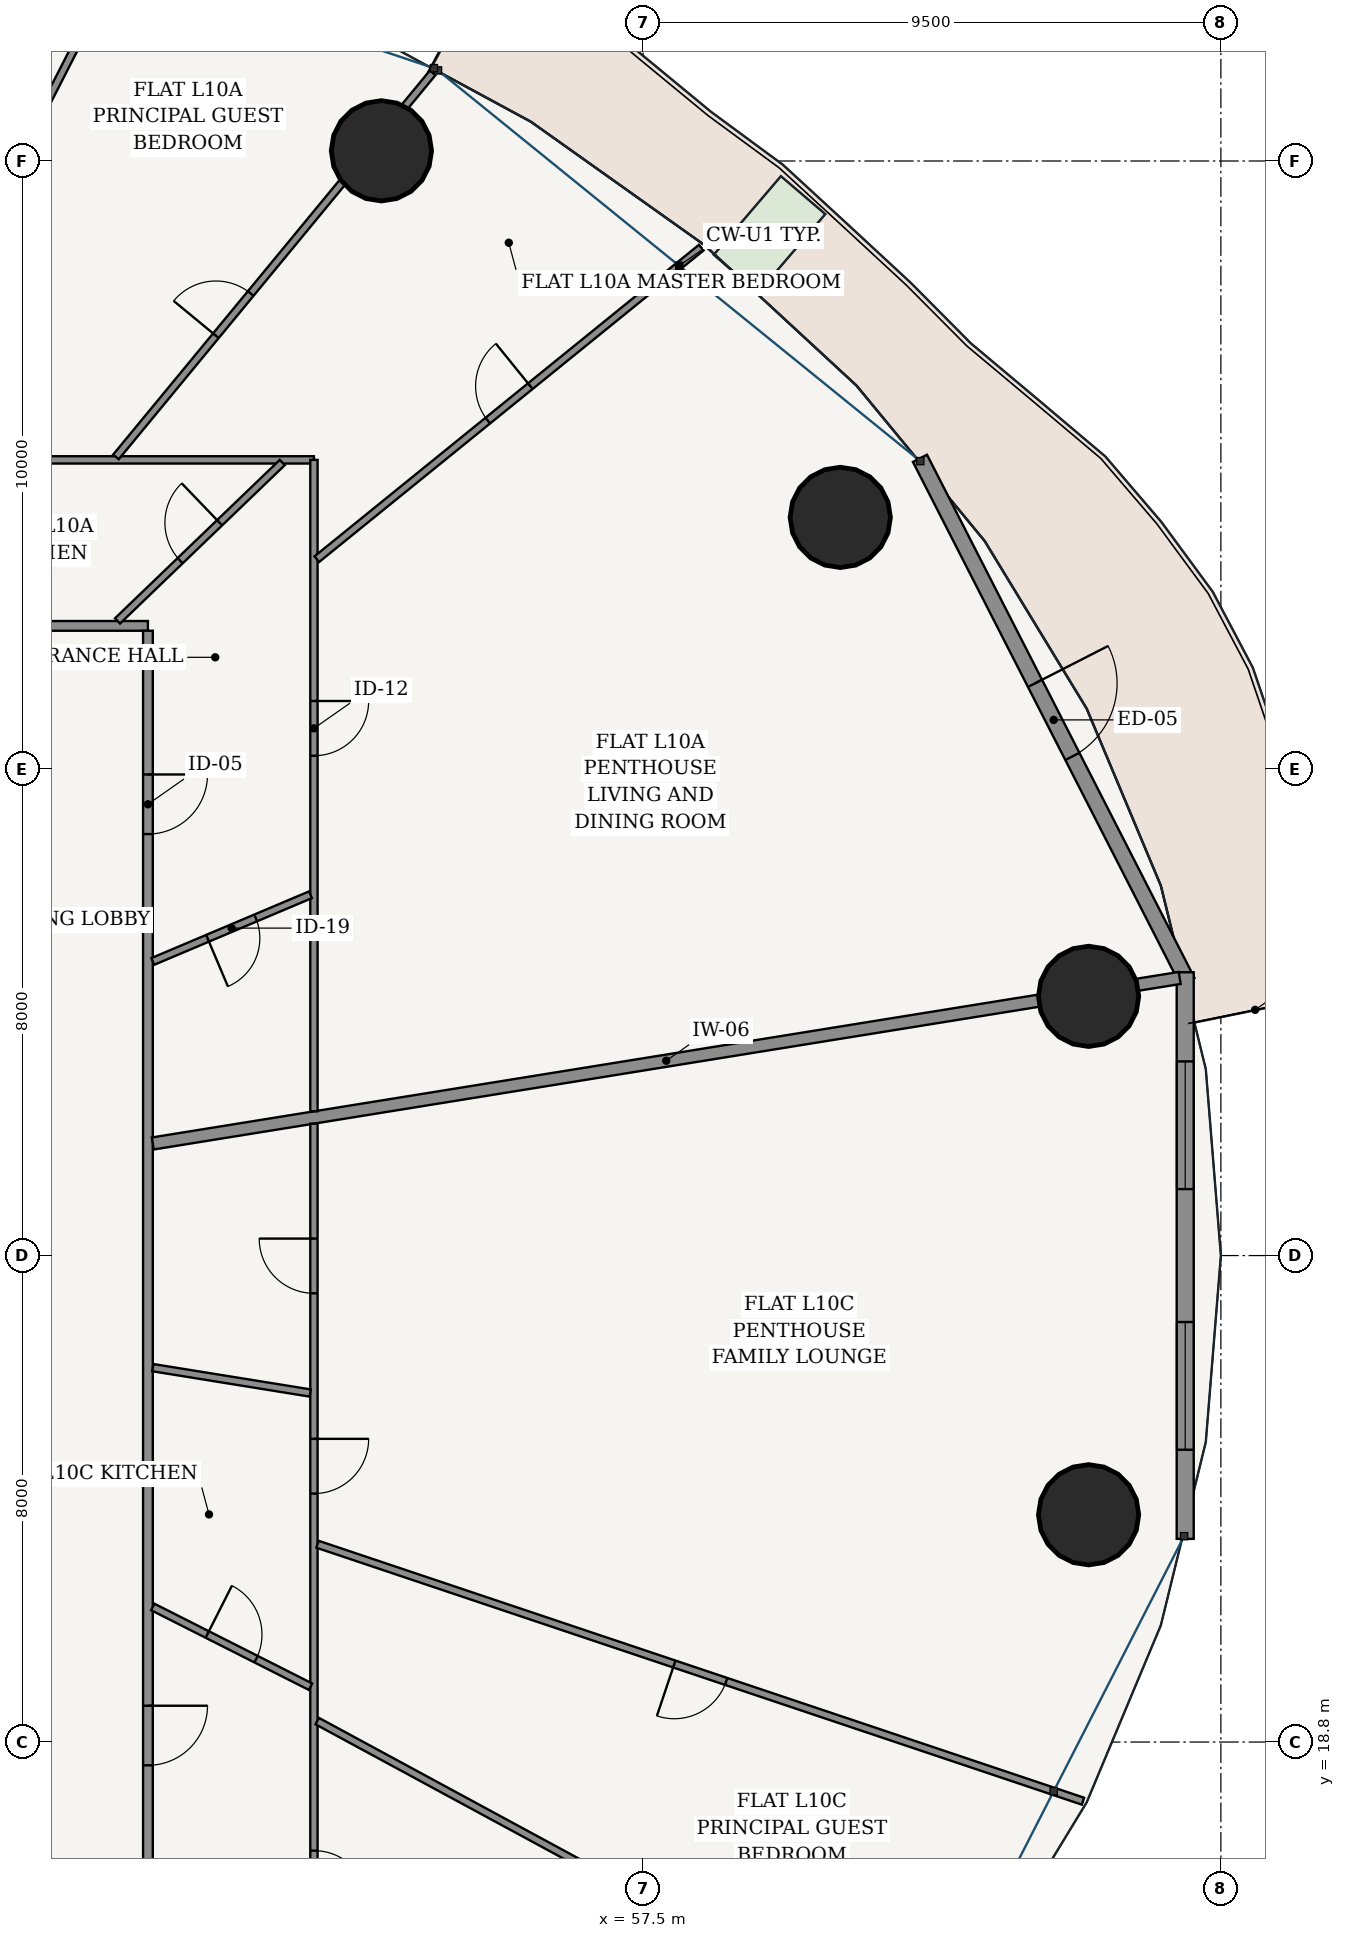
"""IFC4 building model, lengths in metres.
Left out: names, types, materials, properties, quantities, classifications, styles, units other than length and angle.
Written with IfcOpenShell. Run it as: python <this file> out.ifc"""

import sys

from ifc_helpers import new_model, si_unit, direction, frame, frame_2d, origin, origin_2d, place, context, subcontext, project, spatial, rectangle, hollow_circle, extrude, source, transform, mapped, element, fill, save


model = new_model("IFC4")
c1 = context("Model", 3, precision=1e-05, world=origin(), true_north=direction((-0.2419218956, 0.970295726276)))
c2 = subcontext(c1, "Body", "Model", "MODEL_VIEW")
j1 = project(units=[si_unit("LENGTHUNIT", "METRE"), si_unit("PLANEANGLEUNIT", "RADIAN")], contexts=[c1])
p1 = place(None, origin())
s1 = spatial("IfcSite", under=j1, at=p1, CompositionType="ELEMENT")
p2 = place(p1, origin())
s2 = spatial("IfcBuilding", under=s1, at=p2, CompositionType="ELEMENT")
p3 = place(p2, frame((0.0, 0.0, 42.0)))
s3 = spatial("IfcBuildingStorey", under=s2, at=p3, CompositionType="ELEMENT", Elevation=42.0)
for number, where, z_axis, x_axis in (
    (1, (64.824, 31.063, 0.0), (0.0, 0.0, 1.0), (1.0, 0.0, 0.0)),
    (2, (60.741, 38.939, 0.0), (0.0, 0.0, 1.0), (1.0, 0.0, 0.0)),
    (3, (53.195, 44.968, 0.0), (0.0, 0.0, 1.0), (1.0, 0.0, 0.0)),
    (4, (64.824, 22.537, 0.0), (0.0, 0.0, 1.0), (1.0, 0.0, 0.0)),
):
    element("IfcColumn", number, at=place(p3, frame(where, z_axis=z_axis, x_axis=x_axis)), inside=s3, PredefinedType="COLUMN", context=c2, shape_type="SweptSolid", body=[
        extrude(hollow_circle(Radius=0.825, WallThickness=0.05, at=origin_2d()), origin(), (0.0, 0.0, 1.0), 3.6),
    ])
p4 = place(p3, frame((66.45, 31.308, 0.0), z_axis=(0.0, 0.0, 1.0), x_axis=(-0.45523081716, 0.890373462715, 0.0)))
e5 = element("IfcWall", 5, at=p4, inside=s3, PredefinedType="SOLIDWALL", context=c2, shape_type="SweptSolid", body=[
    extrude(rectangle(XDim=9.662, YDim=0.26, at=frame_2d((4.831, 0.0))), origin(), (0.0, 0.0, 1.0), 3.32),
])
p5 = place(p4, frame((4.156, 0.0, 0.0)))
e6 = element("IfcOpeningElement", 6, at=p5, cuts=e5, PredefinedType="OPENING", context=c2, shape_type="SweptSolid", body=[
    extrude(rectangle(XDim=1.35, YDim=2.2, at=frame_2d((0.675, 1.1))), frame((0.0, 0.14, 0.0), z_axis=(0.0, -1.0, 0.0), x_axis=(1.0, 0.0, 0.0)), (0.0, 0.0, 1.0), 0.28),
])
p6 = place(p3, frame((66.413, 22.141, 0.0), z_axis=(0.0, 0.0, 1.0), x_axis=(0.0, 1.0, 0.0)))
e7 = element("IfcWall", 7, at=p6, inside=s3, PredefinedType="SOLIDWALL", context=c2, shape_type="SweptSolid", body=[
    extrude(rectangle(XDim=9.318, YDim=0.28, at=frame_2d((4.659, 0.0))), origin(), (0.0, 0.0, 1.0), 3.32),
])
p7 = place(p6, frame((1.466, 0.0, 0.85)))
e8 = element("IfcOpeningElement", 8, at=p7, cuts=e7, PredefinedType="OPENING", context=c2, shape_type="SweptSolid", body=[
    extrude(rectangle(XDim=2.1, YDim=1.95, at=frame_2d((1.05, 0.975))), frame((0.0, 0.15, 0.0), z_axis=(0.0, -1.0, 0.0), x_axis=(1.0, 0.0, 0.0)), (0.0, 0.0, 1.0), 0.3),
])
p8 = place(p6, frame((5.752, 0.0, 0.85)))
e9 = element("IfcOpeningElement", 9, at=p8, cuts=e7, PredefinedType="OPENING", context=c2, shape_type="SweptSolid", body=[
    extrude(rectangle(XDim=2.1, YDim=1.95, at=frame_2d((1.05, 0.975))), frame((0.0, 0.15, 0.0), z_axis=(0.0, -1.0, 0.0), x_axis=(1.0, 0.0, 0.0)), (0.0, 0.0, 1.0), 0.3),
])
p9 = place(p3, frame((26.645, 37.155, 0.0), z_axis=(0.0, 0.0, 1.0), x_axis=(1.0, 0.0, 0.0)))
e10 = element("IfcWall", 10, at=p9, inside=s3, PredefinedType="PARTITIONING", context=c2, shape_type="SweptSolid", body=[
    extrude(rectangle(XDim=22.71, YDim=0.16, at=frame_2d((11.355, 0.0))), origin(), (0.0, 0.0, 1.0), 2.688),
])
p10 = place(p3, frame((49.355, 16.525, 0.0), z_axis=(0.0, 0.0, 1.0), x_axis=(0.0, 1.0, 0.0)))
e11 = element("IfcWall", 11, at=p10, inside=s3, PredefinedType="PARTITIONING", context=c2, shape_type="SweptSolid", body=[
    extrude(rectangle(XDim=20.55, YDim=0.16, at=frame_2d((10.275, 0.0))), origin(), (0.0, 0.0, 1.0), 2.688),
])
p11 = place(p10, frame((17.207, 0.0, 0.0)))
e12 = element("IfcOpeningElement", 12, at=p11, cuts=e11, PredefinedType="OPENING", context=c2, shape_type="SweptSolid", body=[
    extrude(rectangle(XDim=0.98, YDim=2.2, at=frame_2d((0.49, 1.1))), frame((0.0, 0.09, 0.0), z_axis=(0.0, -1.0, 0.0), x_axis=(1.0, 0.0, 0.0)), (0.0, 0.0, 1.0), 0.18),
])
p12 = place(p10, frame((1.892, 0.0, 0.0)))
e13 = element("IfcOpeningElement", 13, at=p12, cuts=e11, PredefinedType="OPENING", context=c2, shape_type="SweptSolid", body=[
    extrude(rectangle(XDim=0.98, YDim=2.2, at=frame_2d((0.49, 1.1))), frame((0.0, 0.09, 0.0), z_axis=(0.0, -1.0, 0.0), x_axis=(1.0, 0.0, 0.0)), (0.0, 0.0, 1.0), 0.18),
])
p13 = place(p3, frame((49.435, 28.643, 0.0), z_axis=(0.0, 0.0, 1.0), x_axis=(0.987255953651, 0.159140447344, 0.0)))
e14 = element("IfcWall", 14, at=p13, inside=s3, PredefinedType="PARTITIONING", context=c2, shape_type="SweptSolid", body=[
    extrude(rectangle(XDim=17.105, YDim=0.2, at=frame_2d((8.553, 0.0))), origin(), (0.0, 0.0, 1.0), 2.688),
])
p14 = place(p3, frame((27.312, 39.885, 0.0), z_axis=(0.0, 0.0, 1.0), x_axis=(1.0, 0.0, 0.0)))
e15 = element("IfcWall", 15, at=p14, inside=s3, PredefinedType="PARTITIONING", context=c2, shape_type="SweptSolid", body=[
    extrude(rectangle(XDim=24.772, YDim=0.12, at=frame_2d((12.386, 0.0))), origin(), (0.0, 0.0, 1.0), 2.688),
])
p15 = place(p3, frame((52.085, 39.885, 0.0), z_axis=(0.0, 0.0, 1.0), x_axis=(0.0, -1.0, 0.0)))
e16 = element("IfcWall", 16, at=p15, inside=s3, PredefinedType="PARTITIONING", context=c2, shape_type="SweptSolid", body=[
    extrude(rectangle(XDim=10.713, YDim=0.12, at=frame_2d((5.356, 0.0))), origin(), (0.0, 0.0, 1.0), 2.688),
])
p16 = place(p15, frame((3.965, 0.0, 0.0)))
e17 = element("IfcOpeningElement", 17, at=p16, cuts=e16, PredefinedType="OPENING", context=c2, shape_type="SweptSolid", body=[
    extrude(rectangle(XDim=0.9, YDim=2.15, at=frame_2d((0.45, 1.075))), frame((0.0, 0.07, 0.0), z_axis=(0.0, -1.0, 0.0), x_axis=(1.0, 0.0, 0.0)), (0.0, 0.0, 1.0), 0.14),
])
p17 = place(p3, frame((52.133, 38.253, 0.0), z_axis=(0.0, 0.0, 1.0), x_axis=(0.776936623447, 0.629578814087, 0.0)))
e18 = element("IfcWall", 18, at=p17, inside=s3, PredefinedType="PARTITIONING", context=c2, shape_type="SweptSolid", body=[
    extrude(rectangle(XDim=8.136, YDim=0.12, at=frame_2d((4.068, 0.0))), origin(), (0.0, 0.0, 1.0), 2.762),
])
p18 = place(p17, frame((3.618, 0.0, 0.0)))
e19 = element("IfcOpeningElement", 19, at=p18, cuts=e18, PredefinedType="OPENING", context=c2, shape_type="SweptSolid", body=[
    extrude(rectangle(XDim=0.9, YDim=2.15, at=frame_2d((0.45, 1.075))), frame((0.0, 0.07, 0.0), z_axis=(0.0, -1.0, 0.0), x_axis=(1.0, 0.0, 0.0)), (0.0, 0.0, 1.0), 0.14),
])
p19 = place(p3, frame((48.829, 39.933, 0.0), z_axis=(0.0, 0.0, 1.0), x_axis=(0.636192172227, 0.771530634516, 0.0)))
e20 = element("IfcWall", 20, at=p19, inside=s3, PredefinedType="PARTITIONING", context=c2, shape_type="SweptSolid", body=[
    extrude(rectangle(XDim=8.186, YDim=0.12, at=frame_2d((4.093, 0.0))), origin(), (0.0, 0.0, 1.0), 2.688),
])
p20 = place(p19, frame((2.584, 0.0, 0.0)))
e21 = element("IfcOpeningElement", 21, at=p20, cuts=e20, PredefinedType="OPENING", context=c2, shape_type="SweptSolid", body=[
    extrude(rectangle(XDim=0.9, YDim=2.15, at=frame_2d((0.45, 1.075))), frame((0.0, 0.07, 0.0), z_axis=(0.0, -1.0, 0.0), x_axis=(1.0, 0.0, 0.0)), (0.0, 0.0, 1.0), 0.14),
])
p21 = place(p3, frame((44.717, 39.94, 0.0), z_axis=(0.0, 0.0, 1.0), x_axis=(0.455131303234, 0.890424335256, 0.0)))
e22 = element("IfcWall", 22, at=p21, inside=s3, PredefinedType="PARTITIONING", context=c2, shape_type="SweptSolid", body=[
    extrude(rectangle(XDim=9.562, YDim=0.12, at=frame_2d((4.781, 0.0))), origin(), (0.0, 0.0, 1.0), 2.762),
])
p22 = place(p21, frame((4.331, 0.0, 0.0)))
e23 = element("IfcOpeningElement", 23, at=p22, cuts=e22, PredefinedType="OPENING", context=c2, shape_type="SweptSolid", body=[
    extrude(rectangle(XDim=0.9, YDim=2.15, at=frame_2d((0.45, 1.075))), frame((0.0, 0.07, 0.0), z_axis=(0.0, -1.0, 0.0), x_axis=(1.0, 0.0, 0.0)), (0.0, 0.0, 1.0), 0.14),
])
p23 = place(p3, frame((49.435, 31.636, 0.0), z_axis=(0.0, 0.0, 1.0), x_axis=(0.920969644836, 0.389634332792, 0.0)))
e24 = element("IfcWall", 24, at=p23, inside=s3, PredefinedType="PARTITIONING", context=c2, shape_type="SweptSolid", body=[
    extrude(rectangle(XDim=2.815, YDim=0.12, at=frame_2d((1.408, 0.0))), origin(), (0.0, 0.0, 1.0), 3.32),
])
p24 = place(p23, frame((0.978, 0.0, 0.0)))
e25 = element("IfcOpeningElement", 25, at=p24, cuts=e24, PredefinedType="OPENING", context=c2, shape_type="SweptSolid", body=[
    extrude(rectangle(XDim=0.86, YDim=2.15, at=frame_2d((0.43, 1.075))), frame((0.0, 0.07, 0.0), z_axis=(0.0, -1.0, 0.0), x_axis=(1.0, 0.0, 0.0)), (0.0, 0.0, 1.0), 0.14),
])
p25 = place(p3, frame((48.855, 37.236, 0.0), z_axis=(0.0, 0.0, 1.0), x_axis=(0.720835560675, 0.693106120638, 0.0)))
e26 = element("IfcWall", 26, at=p25, inside=s3, PredefinedType="PARTITIONING", context=c2, shape_type="SweptSolid", body=[
    extrude(rectangle(XDim=3.76, YDim=0.12, at=frame_2d((1.88, 0.0))), origin(), (0.0, 0.0, 1.0), 2.999),
])
p26 = place(p25, frame((1.43, 0.0, 0.0)))
e27 = element("IfcOpeningElement", 27, at=p26, cuts=e26, PredefinedType="OPENING", context=c2, shape_type="SweptSolid", body=[
    extrude(rectangle(XDim=0.9, YDim=2.15, at=frame_2d((0.45, 1.075))), frame((0.0, 0.07, 0.0), z_axis=(0.0, -1.0, 0.0), x_axis=(1.0, 0.0, 0.0)), (0.0, 0.0, 1.0), 0.14),
])
p27 = place(p3, frame((52.085, 28.968, 0.0), z_axis=(0.0, 0.0, 1.0), x_axis=(0.0, -1.0, 0.0)))
e28 = element("IfcWall", 28, at=p27, inside=s3, PredefinedType="PARTITIONING", context=c2, shape_type="SweptSolid", body=[
    extrude(rectangle(XDim=15.253, YDim=0.12, at=frame_2d((7.626, 0.0))), origin(), (0.0, 0.0, 1.0), 2.688),
])
p28 = place(p27, frame((11.954, 0.0, 0.0)))
e29 = element("IfcOpeningElement", 29, at=p28, cuts=e28, PredefinedType="OPENING", context=c2, shape_type="SweptSolid", body=[
    extrude(rectangle(XDim=0.9, YDim=2.15, at=frame_2d((0.45, 1.075))), frame((0.0, 0.07, 0.0), z_axis=(0.0, -1.0, 0.0), x_axis=(1.0, 0.0, 0.0)), (0.0, 0.0, 1.0), 0.14),
])
p29 = place(p27, frame((5.182, 0.0, 0.0)))
e30 = element("IfcOpeningElement", 30, at=p29, cuts=e28, PredefinedType="OPENING", context=c2, shape_type="SweptSolid", body=[
    extrude(rectangle(XDim=0.9, YDim=2.15, at=frame_2d((0.45, 1.075))), frame((0.0, 0.07, 0.0), z_axis=(0.0, -1.0, 0.0), x_axis=(1.0, 0.0, 0.0)), (0.0, 0.0, 1.0), 0.14),
])
p30 = place(p27, frame((1.889, 0.0, 0.0)))
e31 = element("IfcOpeningElement", 31, at=p30, cuts=e28, PredefinedType="OPENING", context=c2, shape_type="SweptSolid", body=[
    extrude(rectangle(XDim=0.9, YDim=2.15, at=frame_2d((0.45, 1.075))), frame((0.0, 0.07, 0.0), z_axis=(0.0, -1.0, 0.0), x_axis=(1.0, 0.0, 0.0)), (0.0, 0.0, 1.0), 0.14),
])
p31 = place(p3, frame((52.139, 19.144, 0.0), z_axis=(0.0, 0.0, 1.0), x_axis=(0.879372452045, -0.476134529922, 0.0)))
e32 = element("IfcWall", 32, at=p31, inside=s3, PredefinedType="PARTITIONING", context=c2, shape_type="SweptSolid", body=[
    extrude(rectangle(XDim=11.219, YDim=0.12, at=frame_2d((5.61, 0.0))), origin(), (0.0, 0.0, 1.0), 2.688),
])
p32 = place(p3, frame((52.144, 22.052, 0.0), z_axis=(0.0, 0.0, 1.0), x_axis=(0.948023034133, -0.318201707653, 0.0)))
e33 = element("IfcWall", 33, at=p32, inside=s3, PredefinedType="PARTITIONING", context=c2, shape_type="SweptSolid", body=[
    extrude(rectangle(XDim=13.279, YDim=0.12, at=frame_2d((6.639, 0.0))), origin(), (0.0, 0.0, 1.0), 2.762),
])
p33 = place(p32, frame((6.189, 0.0, 0.0)))
e34 = element("IfcOpeningElement", 34, at=p33, cuts=e33, PredefinedType="OPENING", context=c2, shape_type="SweptSolid", body=[
    extrude(rectangle(XDim=0.9, YDim=2.15, at=frame_2d((0.45, 1.075))), frame((0.0, 0.07, 0.0), z_axis=(0.0, -1.0, 0.0), x_axis=(1.0, 0.0, 0.0)), (0.0, 0.0, 1.0), 0.14),
])
p34 = place(p3, frame((49.435, 21.021, 0.0), z_axis=(0.0, 0.0, 1.0), x_axis=(0.892504324967, -0.451038834155, 0.0)))
e35 = element("IfcWall", 35, at=p34, inside=s3, PredefinedType="PARTITIONING", context=c2, shape_type="SweptSolid", body=[
    extrude(rectangle(XDim=2.907, YDim=0.12, at=frame_2d((1.454, 0.0))), origin(), (0.0, 0.0, 1.0), 3.32),
])
p35 = place(p34, frame((1.004, 0.0, 0.0)))
e36 = element("IfcOpeningElement", 36, at=p35, cuts=e35, PredefinedType="OPENING", context=c2, shape_type="SweptSolid", body=[
    extrude(rectangle(XDim=0.9, YDim=2.15, at=frame_2d((0.45, 1.075))), frame((0.0, 0.07, 0.0), z_axis=(0.0, -1.0, 0.0), x_axis=(1.0, 0.0, 0.0)), (0.0, 0.0, 1.0), 0.14),
])
p36 = place(p3, frame((49.435, 24.957, 0.0), z_axis=(0.0, 0.0, 1.0), x_axis=(0.987258113076, -0.159127050386, 0.0)))
e37 = element("IfcWall", 37, at=p36, inside=s3, PredefinedType="PARTITIONING", context=c2, shape_type="SweptSolid", body=[
    extrude(rectangle(XDim=2.622, YDim=0.12, at=frame_2d((1.311, 0.0))), origin(), (0.0, 0.0, 1.0), 2.688),
])
m1 = source(origin(), c2, "Body", "SweptSolid", [
    extrude(rectangle(XDim=1.35, YDim=2.2, at=frame_2d((0.675, 1.1))), frame((0.0, 0.025, 0.0), z_axis=(0.0, -1.0, 0.0), x_axis=(1.0, 0.0, 0.0)), (0.0, 0.0, 1.0), 0.05),
])
p37 = place(p5, frame((1.35, 0.0, 0.0), z_axis=(0.0, 0.0, 1.0), x_axis=(-1.0, 0.0, 0.0)))
e38 = element("IfcDoor", 38, at=p37, inside=s3, OperationType="SINGLE_SWING_LEFT", PredefinedType="DOOR", context=c2, shape_type="MappedRepresentation", body=[
    mapped(m1, transform((0.0, 0.0, 0.0), scale=1.0)),
])
fill(e6, e38)
m2 = source(origin(), c2, "Body", "SweptSolid", [
    extrude(rectangle(XDim=2.1, YDim=1.95, at=frame_2d((1.05, 0.975))), frame((0.0, 0.03, 0.0), z_axis=(0.0, -1.0, 0.0), x_axis=(1.0, 0.0, 0.0)), (0.0, 0.0, 1.0), 0.06),
])
p38 = place(p7, origin())
e39 = element("IfcWindow", 39, at=p38, inside=s3, PartitioningType="SINGLE_PANEL", PredefinedType="WINDOW", context=c2, shape_type="MappedRepresentation", body=[
    mapped(m2, transform((0.0, 0.0, 0.0), scale=1.0)),
])
fill(e8, e39)
p39 = place(p8, origin())
e40 = element("IfcWindow", 40, at=p39, inside=s3, PartitioningType="SINGLE_PANEL", PredefinedType="WINDOW", context=c2, shape_type="MappedRepresentation", body=[
    mapped(m2, transform((0.0, 0.0, 0.0), scale=1.0)),
])
fill(e9, e40)
m3 = source(origin(), c2, "Body", "SweptSolid", [
    extrude(rectangle(XDim=0.98, YDim=2.2, at=frame_2d((0.49, 1.1))), frame((0.0, 0.025, 0.0), z_axis=(0.0, -1.0, 0.0), x_axis=(1.0, 0.0, 0.0)), (0.0, 0.0, 1.0), 0.05),
])
p40 = place(p11, frame((0.98, 0.0, 0.0), z_axis=(0.0, 0.0, 1.0), x_axis=(-1.0, 0.0, 0.0)))
e41 = element("IfcDoor", 41, at=p40, inside=s3, OperationType="SINGLE_SWING_LEFT", PredefinedType="DOOR", context=c2, shape_type="MappedRepresentation", body=[
    mapped(m3, transform((0.0, 0.0, 0.0), scale=1.0)),
])
fill(e12, e41)
m4 = source(origin(), c2, "Body", "SweptSolid", [
    extrude(rectangle(XDim=0.86, YDim=2.15, at=frame_2d((0.43, 1.075))), frame((0.0, 0.025, 0.0), z_axis=(0.0, -1.0, 0.0), x_axis=(1.0, 0.0, 0.0)), (0.0, 0.0, 1.0), 0.05),
])
p41 = place(p24, frame((0.86, 0.0, 0.0), z_axis=(0.0, 0.0, 1.0), x_axis=(-1.0, 0.0, 0.0)))
e42 = element("IfcDoor", 42, at=p41, inside=s3, OperationType="SINGLE_SWING_RIGHT", PredefinedType="DOOR", context=c2, shape_type="MappedRepresentation", body=[
    mapped(m4, transform((0.0, 0.0, 0.0), scale=1.0)),
])
fill(e25, e42)
m5 = source(origin(), c2, "Body", "SweptSolid", [
    extrude(rectangle(XDim=0.9, YDim=2.15, at=frame_2d((0.45, 1.075))), frame((0.0, 0.025, 0.0), z_axis=(0.0, -1.0, 0.0), x_axis=(1.0, 0.0, 0.0)), (0.0, 0.0, 1.0), 0.05),
])
p42 = place(p16, origin())
e43 = element("IfcDoor", 43, at=p42, inside=s3, OperationType="SINGLE_SWING_LEFT", PredefinedType="DOOR", context=c2, shape_type="MappedRepresentation", body=[
    mapped(m5, transform((0.0, 0.0, 0.0), scale=1.0)),
])
fill(e17, e43)
p43 = place(p26, origin())
e44 = element("IfcDoor", 44, at=p43, inside=s3, OperationType="SINGLE_SWING_RIGHT", PredefinedType="DOOR", context=c2, shape_type="MappedRepresentation", body=[
    mapped(m5, transform((0.0, 0.0, 0.0), scale=1.0)),
])
fill(e27, e44)
p44 = place(p18, origin())
e45 = element("IfcDoor", 45, at=p44, inside=s3, OperationType="SINGLE_SWING_RIGHT", PredefinedType="DOOR", context=c2, shape_type="MappedRepresentation", body=[
    mapped(m5, transform((0.0, 0.0, 0.0), scale=1.0)),
])
fill(e19, e45)
p45 = place(p20, origin())
e46 = element("IfcDoor", 46, at=p45, inside=s3, OperationType="SINGLE_SWING_LEFT", PredefinedType="DOOR", context=c2, shape_type="MappedRepresentation", body=[
    mapped(m5, transform((0.0, 0.0, 0.0), scale=1.0)),
])
fill(e21, e46)
p46 = place(p12, frame((0.98, 0.0, 0.0), z_axis=(0.0, 0.0, 1.0), x_axis=(-1.0, 0.0, 0.0)))
e47 = element("IfcDoor", 47, at=p46, inside=s3, OperationType="SINGLE_SWING_LEFT", PredefinedType="DOOR", context=c2, shape_type="MappedRepresentation", body=[
    mapped(m3, transform((0.0, 0.0, 0.0), scale=1.0)),
])
fill(e13, e47)
p47 = place(p35, origin())
e48 = element("IfcDoor", 48, at=p47, inside=s3, OperationType="SINGLE_SWING_LEFT", PredefinedType="DOOR", context=c2, shape_type="MappedRepresentation", body=[
    mapped(m5, transform((0.0, 0.0, 0.0), scale=1.0)),
])
fill(e36, e48)
p48 = place(p28, origin())
e49 = element("IfcDoor", 49, at=p48, inside=s3, OperationType="SINGLE_SWING_RIGHT", PredefinedType="DOOR", context=c2, shape_type="MappedRepresentation", body=[
    mapped(m5, transform((0.0, 0.0, 0.0), scale=1.0)),
])
fill(e29, e49)
p49 = place(p29, origin())
e50 = element("IfcDoor", 50, at=p49, inside=s3, OperationType="SINGLE_SWING_LEFT", PredefinedType="DOOR", context=c2, shape_type="MappedRepresentation", body=[
    mapped(m5, transform((0.0, 0.0, 0.0), scale=1.0)),
])
fill(e30, e50)
p50 = place(p30, frame((0.9, 0.0, 0.0), z_axis=(0.0, 0.0, 1.0), x_axis=(-1.0, 0.0, 0.0)))
e51 = element("IfcDoor", 51, at=p50, inside=s3, OperationType="SINGLE_SWING_RIGHT", PredefinedType="DOOR", context=c2, shape_type="MappedRepresentation", body=[
    mapped(m5, transform((0.0, 0.0, 0.0), scale=1.0)),
])
fill(e31, e51)
p51 = place(p33, frame((0.9, 0.0, 0.0), z_axis=(0.0, 0.0, 1.0), x_axis=(-1.0, 0.0, 0.0)))
e52 = element("IfcDoor", 52, at=p51, inside=s3, OperationType="SINGLE_SWING_RIGHT", PredefinedType="DOOR", context=c2, shape_type="MappedRepresentation", body=[
    mapped(m5, transform((0.0, 0.0, 0.0), scale=1.0)),
])
fill(e34, e52)
save(model, sys.argv[1])
